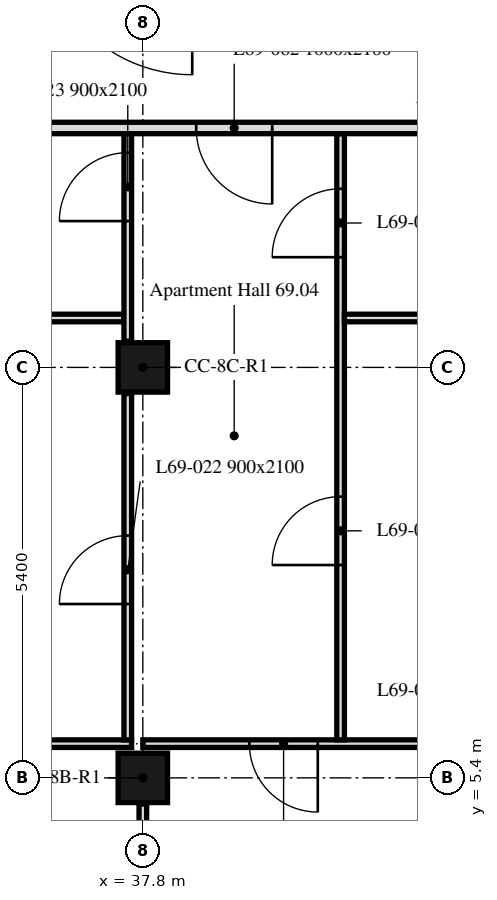
"""IFC4 building model, lengths in metres.
Left out: names, types, materials, properties, quantities, classifications, styles, units other than length and angle.
Written with IfcOpenShell. Run it as: python <this file> out.ifc"""

import sys

from ifc_helpers import new_model, si_unit, direction, frame, frame_2d, origin, origin_2d, place, context, subcontext, project, spatial, rectangle, extrude, element, fill, save


model = new_model("IFC4")
c1 = context("Model", 3, precision=1e-05, world=origin(), true_north=direction((0.0, 1.0)))
c2 = subcontext(c1, "Body", "Model", "MODEL_VIEW")
j1 = project(units=[si_unit("LENGTHUNIT", "METRE"), si_unit("PLANEANGLEUNIT", "RADIAN")], contexts=[c1])
p1 = place(None, origin())
s1 = spatial("IfcSite", under=j1, at=p1, CompositionType="ELEMENT")
p2 = place(p1, origin())
s2 = spatial("IfcBuilding", under=s1, at=p2, CompositionType="ELEMENT")
p3 = place(p2, frame((0.0, 0.0, 281.8)))
s3 = spatial("IfcBuildingStorey", under=s2, at=p3, CompositionType="ELEMENT", Elevation=281.8)
for number, where, z_axis, x_axis in (
    (1, (37.8, 5.4, 0.0), (0.0, 0.0, 1.0), (1.0, 0.0, 0.0)),
    (2, (37.8, 10.8, 0.0), (0.0, 0.0, 1.0), (1.0, 0.0, 0.0)),
):
    element("IfcColumn", number, at=place(p3, frame(where, z_axis=z_axis, x_axis=x_axis)), inside=s3, PredefinedType="COLUMN", context=c2, shape_type="SweptSolid", body=[
        extrude(rectangle(XDim=0.65, YDim=0.65, at=origin_2d()), origin(), (0.0, 0.0, 1.0), 3.0),
    ])
p4 = place(p3, frame((37.652, 5.85, 0.0), z_axis=(0.0, 0.0, 1.0), x_axis=(-1.0, 0.0, 0.0)))
e3 = element("IfcWall", 3, at=p4, inside=s3, PredefinedType="PARTITIONING", context=c2, shape_type="SweptSolid", body=[
    extrude(rectangle(XDim=31.501, YDim=0.1, at=frame_2d((15.75, 0.0))), origin(), (0.0, 0.0, 1.0), 2.4),
])
p5 = place(p4, frame((12.923, 0.0, 0.0)))
e4 = element("IfcOpeningElement", 4, at=p5, cuts=e3, PredefinedType="OPENING", context=c2, shape_type="SweptSolid", body=[
    extrude(rectangle(XDim=0.9, YDim=2.1, at=frame_2d((0.45, 1.05))), frame((0.0, 0.05, 0.0), z_axis=(0.0, -1.0, 0.0), x_axis=(1.0, 0.0, 0.0)), (0.0, 0.0, 1.0), 0.1),
])
p6 = place(p4, frame((29.422, 0.0, 0.0)))
e5 = element("IfcOpeningElement", 5, at=p6, cuts=e3, PredefinedType="OPENING", context=c2, shape_type="SweptSolid", body=[
    extrude(rectangle(XDim=0.9, YDim=2.1, at=frame_2d((0.45, 1.05))), frame((0.0, 0.05, 0.0), z_axis=(0.0, -1.0, 0.0), x_axis=(1.0, 0.0, 0.0)), (0.0, 0.0, 1.0), 0.1),
])
p7 = place(p4, frame((28.182, 0.0, 0.0)))
e6 = element("IfcOpeningElement", 6, at=p7, cuts=e3, PredefinedType="OPENING", context=c2, shape_type="SweptSolid", body=[
    extrude(rectangle(XDim=0.9, YDim=2.1, at=frame_2d((0.45, 1.05))), frame((0.0, 0.05, 0.0), z_axis=(0.0, -1.0, 0.0), x_axis=(1.0, 0.0, 0.0)), (0.0, 0.0, 1.0), 0.1),
])
p8 = place(p4, frame((23.942, 0.0, 0.0)))
e7 = element("IfcOpeningElement", 7, at=p8, cuts=e3, PredefinedType="OPENING", context=c2, shape_type="SweptSolid", body=[
    extrude(rectangle(XDim=0.9, YDim=2.1, at=frame_2d((0.45, 1.05))), frame((0.0, 0.05, 0.0), z_axis=(0.0, -1.0, 0.0), x_axis=(1.0, 0.0, 0.0)), (0.0, 0.0, 1.0), 0.1),
])
p9 = place(p4, frame((22.572, 0.0, 0.0)))
e8 = element("IfcOpeningElement", 8, at=p9, cuts=e3, PredefinedType="OPENING", context=c2, shape_type="SweptSolid", body=[
    extrude(rectangle(XDim=0.9, YDim=2.1, at=frame_2d((0.45, 1.05))), frame((0.0, 0.05, 0.0), z_axis=(0.0, -1.0, 0.0), x_axis=(1.0, 0.0, 0.0)), (0.0, 0.0, 1.0), 0.1),
])
p10 = place(p4, frame((19.466, 0.0, 0.0)))
e9 = element("IfcOpeningElement", 9, at=p10, cuts=e3, PredefinedType="OPENING", context=c2, shape_type="SweptSolid", body=[
    extrude(rectangle(XDim=0.9, YDim=2.1, at=frame_2d((0.45, 1.05))), frame((0.0, 0.05, 0.0), z_axis=(0.0, -1.0, 0.0), x_axis=(1.0, 0.0, 0.0)), (0.0, 0.0, 1.0), 0.1),
])
p11 = place(p4, frame((9.19, 0.0, 0.0)))
e10 = element("IfcOpeningElement", 10, at=p11, cuts=e3, PredefinedType="OPENING", context=c2, shape_type="SweptSolid", body=[
    extrude(rectangle(XDim=0.9, YDim=2.1, at=frame_2d((0.45, 1.05))), frame((0.0, 0.05, 0.0), z_axis=(0.0, -1.0, 0.0), x_axis=(1.0, 0.0, 0.0)), (0.0, 0.0, 1.0), 0.1),
])
p12 = place(p4, frame((7.512, 0.0, 0.0)))
e11 = element("IfcOpeningElement", 11, at=p12, cuts=e3, PredefinedType="OPENING", context=c2, shape_type="SweptSolid", body=[
    extrude(rectangle(XDim=0.9, YDim=2.1, at=frame_2d((0.45, 1.05))), frame((0.0, 0.05, 0.0), z_axis=(0.0, -1.0, 0.0), x_axis=(1.0, 0.0, 0.0)), (0.0, 0.0, 1.0), 0.1),
])
p13 = place(p4, frame((2.952, 0.0, 0.0)))
e12 = element("IfcOpeningElement", 12, at=p13, cuts=e3, PredefinedType="OPENING", context=c2, shape_type="SweptSolid", body=[
    extrude(rectangle(XDim=0.9, YDim=2.1, at=frame_2d((0.45, 1.05))), frame((0.0, 0.05, 0.0), z_axis=(0.0, -1.0, 0.0), x_axis=(1.0, 0.0, 0.0)), (0.0, 0.0, 1.0), 0.1),
])
p14 = place(p4, frame((18.096, 0.0, 0.0)))
e13 = element("IfcOpeningElement", 13, at=p14, cuts=e3, PredefinedType="OPENING", context=c2, shape_type="SweptSolid", body=[
    extrude(rectangle(XDim=0.9, YDim=2.1, at=frame_2d((0.45, 1.05))), frame((0.0, 0.05, 0.0), z_axis=(0.0, -1.0, 0.0), x_axis=(1.0, 0.0, 0.0)), (0.0, 0.0, 1.0), 0.1),
])
p15 = place(p3, frame((37.8, 0.751, 0.0), z_axis=(0.0, 0.0, 1.0), x_axis=(0.0, 1.0, 0.0)))
e14 = element("IfcWall", 14, at=p15, inside=s3, PredefinedType="PARTITIONING", context=c2, shape_type="SweptSolid", body=[
    extrude(rectangle(XDim=4.304, YDim=0.1, at=frame_2d((2.152, 0.0))), origin(), (0.0, 0.0, 1.0), 2.4),
])
p16 = place(p15, frame((1.18, 0.0, 0.0)))
e15 = element("IfcOpeningElement", 15, at=p16, cuts=e14, PredefinedType="OPENING", context=c2, shape_type="SweptSolid", body=[
    extrude(rectangle(XDim=0.9, YDim=2.1, at=frame_2d((0.45, 1.05))), frame((0.0, 0.05, 0.0), z_axis=(0.0, -1.0, 0.0), x_axis=(1.0, 0.0, 0.0)), (0.0, 0.0, 1.0), 0.1),
])
p17 = place(p3, frame((43.15, 5.85, 0.0), z_axis=(0.0, 0.0, 1.0), x_axis=(-1.0, 0.0, 0.0)))
e16 = element("IfcWall", 16, at=p17, inside=s3, PredefinedType="PARTITIONING", context=c2, shape_type="SweptSolid", body=[
    extrude(rectangle(XDim=5.35, YDim=0.1, at=frame_2d((2.675, 0.0))), origin(), (0.0, 0.0, 1.0), 3.0),
])
p18 = place(p17, frame((3.048, 0.0, 0.0)))
e17 = element("IfcOpeningElement", 17, at=p18, cuts=e16, PredefinedType="OPENING", context=c2, shape_type="SweptSolid", body=[
    extrude(rectangle(XDim=0.9, YDim=2.1, at=frame_2d((0.45, 1.05))), frame((0.0, 0.05, 0.0), z_axis=(0.0, -1.0, 0.0), x_axis=(1.0, 0.0, 0.0)), (0.0, 0.0, 1.0), 0.1),
])
p19 = place(p3, frame((37.602, 5.9, 0.0), z_axis=(0.0, 0.0, 1.0), x_axis=(0.0, 1.0, 0.0)))
e18 = element("IfcWall", 18, at=p19, inside=s3, PredefinedType="PARTITIONING", context=c2, shape_type="SweptSolid", body=[
    extrude(rectangle(XDim=4.555, YDim=0.1, at=frame_2d((2.278, 0.0))), origin(), (0.0, 0.0, 1.0), 2.4),
])
p20 = place(p19, frame((1.787, 0.0, 0.0)))
e19 = element("IfcOpeningElement", 19, at=p20, cuts=e18, PredefinedType="OPENING", context=c2, shape_type="SweptSolid", body=[
    extrude(rectangle(XDim=0.9, YDim=2.1, at=frame_2d((0.45, 1.05))), frame((0.0, 0.05, 0.0), z_axis=(0.0, -1.0, 0.0), x_axis=(1.0, 0.0, 0.0)), (0.0, 0.0, 1.0), 0.1),
])
p21 = place(p3, frame((37.552, 11.45, 0.0), z_axis=(0.0, 0.0, 1.0), x_axis=(-1.0, 0.0, 0.0)))
e20 = element("IfcWall", 20, at=p21, inside=s3, PredefinedType="PARTITIONING", context=c2, shape_type="SweptSolid", body=[
    extrude(rectangle(XDim=2.502, YDim=0.1, at=frame_2d((1.251, 0.0))), origin(), (0.0, 0.0, 1.0), 3.0),
])
p22 = place(p3, frame((37.602, 11.145, 0.0), z_axis=(0.0, 0.0, 1.0), x_axis=(0.0, 1.0, 0.0)))
e21 = element("IfcWall", 21, at=p22, inside=s3, PredefinedType="PARTITIONING", context=c2, shape_type="SweptSolid", body=[
    extrude(rectangle(XDim=2.73, YDim=0.1, at=frame_2d((1.365, 0.0))), origin(), (0.0, 0.0, 1.0), 2.4),
])
p23 = place(p22, frame((1.58, 0.0, 0.0)))
e22 = element("IfcOpeningElement", 22, at=p23, cuts=e21, PredefinedType="OPENING", context=c2, shape_type="SweptSolid", body=[
    extrude(rectangle(XDim=0.9, YDim=2.1, at=frame_2d((0.45, 1.05))), frame((0.0, 0.05, 0.0), z_axis=(0.0, -1.0, 0.0), x_axis=(1.0, 0.0, 0.0)), (0.0, 0.0, 1.0), 0.1),
])
p24 = place(p3, frame((40.402, 5.9, 0.0), z_axis=(0.0, 0.0, 1.0), x_axis=(0.0, 1.0, 0.0)))
e23 = element("IfcWall", 23, at=p24, inside=s3, PredefinedType="PARTITIONING", context=c2, shape_type="SweptSolid", body=[
    extrude(rectangle(XDim=7.975, YDim=0.1, at=frame_2d((3.988, 0.0))), origin(), (0.0, 0.0, 1.0), 2.4),
])
p25 = place(p24, frame((2.3, 0.0, 0.0)))
e24 = element("IfcOpeningElement", 24, at=p25, cuts=e23, PredefinedType="OPENING", context=c2, shape_type="SweptSolid", body=[
    extrude(rectangle(XDim=0.9, YDim=2.1, at=frame_2d((0.45, 1.05))), frame((0.0, 0.05, 0.0), z_axis=(0.0, -1.0, 0.0), x_axis=(1.0, 0.0, 0.0)), (0.0, 0.0, 1.0), 0.1),
])
p26 = place(p24, frame((6.35, 0.0, 0.0)))
e25 = element("IfcOpeningElement", 25, at=p26, cuts=e23, PredefinedType="OPENING", context=c2, shape_type="SweptSolid", body=[
    extrude(rectangle(XDim=0.9, YDim=2.1, at=frame_2d((0.45, 1.05))), frame((0.0, 0.05, 0.0), z_axis=(0.0, -1.0, 0.0), x_axis=(1.0, 0.0, 0.0)), (0.0, 0.0, 1.0), 0.1),
])
p27 = place(p3, frame((43.231, 11.45, 0.0), z_axis=(0.0, 0.0, 1.0), x_axis=(-1.0, 0.0, 0.0)))
e26 = element("IfcWall", 26, at=p27, inside=s3, PredefinedType="PARTITIONING", context=c2, shape_type="SweptSolid", body=[
    extrude(rectangle(XDim=2.779, YDim=0.1, at=frame_2d((1.39, 0.0))), origin(), (0.0, 0.0, 1.0), 3.0),
])
p28 = place(p3, frame((47.849, 13.95, 0.0), z_axis=(0.0, 0.0, 1.0), x_axis=(-1.0, 0.0, 0.0)))
e27 = element("IfcWall", 27, at=p28, inside=s3, PredefinedType="PARTITIONING", context=c2, shape_type="SweptSolid", body=[
    extrude(rectangle(XDim=41.698, YDim=0.15, at=frame_2d((20.849, 0.0))), origin(), (0.0, 0.0, 1.0), 2.4),
])
p29 = place(p28, frame((37.749, 0.0, 0.0)))
e28 = element("IfcOpeningElement", 28, at=p29, cuts=e27, PredefinedType="OPENING", context=c2, shape_type="SweptSolid", body=[
    extrude(rectangle(XDim=1.0, YDim=2.1, at=frame_2d((0.5, 1.05))), frame((0.0, 0.075, 0.0), z_axis=(0.0, -1.0, 0.0), x_axis=(1.0, 0.0, 0.0)), (0.0, 0.0, 1.0), 0.15),
])
p30 = place(p28, frame((32.244, 0.0, 0.0)))
e29 = element("IfcOpeningElement", 29, at=p30, cuts=e27, PredefinedType="OPENING", context=c2, shape_type="SweptSolid", body=[
    extrude(rectangle(XDim=1.0, YDim=2.1, at=frame_2d((0.5, 1.05))), frame((0.0, 0.075, 0.0), z_axis=(0.0, -1.0, 0.0), x_axis=(1.0, 0.0, 0.0)), (0.0, 0.0, 1.0), 0.15),
])
p31 = place(p28, frame((27.735, 0.0, 0.0)))
e30 = element("IfcOpeningElement", 30, at=p31, cuts=e27, PredefinedType="OPENING", context=c2, shape_type="SweptSolid", body=[
    extrude(rectangle(XDim=1.0, YDim=2.1, at=frame_2d((0.5, 1.05))), frame((0.0, 0.075, 0.0), z_axis=(0.0, -1.0, 0.0), x_axis=(1.0, 0.0, 0.0)), (0.0, 0.0, 1.0), 0.15),
])
p32 = place(p28, frame((8.347, 0.0, 0.0)))
e31 = element("IfcOpeningElement", 31, at=p32, cuts=e27, PredefinedType="OPENING", context=c2, shape_type="SweptSolid", body=[
    extrude(rectangle(XDim=1.0, YDim=2.1, at=frame_2d((0.5, 1.05))), frame((0.0, 0.075, 0.0), z_axis=(0.0, -1.0, 0.0), x_axis=(1.0, 0.0, 0.0)), (0.0, 0.0, 1.0), 0.15),
])
p33 = place(p20, origin())
e32 = element("IfcDoor", 32, at=p33, inside=s3, OperationType="SINGLE_SWING_RIGHT", PredefinedType="DOOR", context=c2, shape_type="SweptSolid", body=[
    extrude(rectangle(XDim=0.9, YDim=2.1, at=frame_2d((0.45, 1.05))), frame((0.0, 0.025, 0.0), z_axis=(0.0, -1.0, 0.0), x_axis=(1.0, 0.0, 0.0)), (0.0, 0.0, 1.0), 0.05),
])
fill(e19, e32)
p34 = place(p23, origin())
e33 = element("IfcDoor", 33, at=p34, inside=s3, OperationType="SINGLE_SWING_LEFT", PredefinedType="DOOR", context=c2, shape_type="SweptSolid", body=[
    extrude(rectangle(XDim=0.9, YDim=2.1, at=frame_2d((0.45, 1.05))), frame((0.0, 0.025, 0.0), z_axis=(0.0, -1.0, 0.0), x_axis=(1.0, 0.0, 0.0)), (0.0, 0.0, 1.0), 0.05),
])
fill(e22, e33)
p35 = place(p25, origin())
e34 = element("IfcDoor", 34, at=p35, inside=s3, OperationType="SINGLE_SWING_LEFT", PredefinedType="DOOR", context=c2, shape_type="SweptSolid", body=[
    extrude(rectangle(XDim=0.9, YDim=2.1, at=frame_2d((0.45, 1.05))), frame((0.0, 0.025, 0.0), z_axis=(0.0, -1.0, 0.0), x_axis=(1.0, 0.0, 0.0)), (0.0, 0.0, 1.0), 0.05),
])
fill(e24, e34)
p36 = place(p26, origin())
e35 = element("IfcDoor", 35, at=p36, inside=s3, OperationType="SINGLE_SWING_LEFT", PredefinedType="DOOR", context=c2, shape_type="SweptSolid", body=[
    extrude(rectangle(XDim=0.9, YDim=2.1, at=frame_2d((0.45, 1.05))), frame((0.0, 0.025, 0.0), z_axis=(0.0, -1.0, 0.0), x_axis=(1.0, 0.0, 0.0)), (0.0, 0.0, 1.0), 0.05),
])
fill(e25, e35)
p37 = place(p18, origin())
e36 = element("IfcDoor", 36, at=p37, inside=s3, OperationType="SINGLE_SWING_RIGHT", PredefinedType="DOOR", context=c2, shape_type="SweptSolid", body=[
    extrude(rectangle(XDim=0.9, YDim=2.1, at=frame_2d((0.45, 1.05))), frame((0.0, 0.025, 0.0), z_axis=(0.0, -1.0, 0.0), x_axis=(1.0, 0.0, 0.0)), (0.0, 0.0, 1.0), 0.05),
])
fill(e17, e36)
p38 = place(p32, origin())
e37 = element("IfcDoor", 37, at=p38, inside=s3, OperationType="SINGLE_SWING_LEFT", PredefinedType="DOOR", context=c2, shape_type="SweptSolid", body=[
    extrude(rectangle(XDim=1.0, YDim=2.1, at=frame_2d((0.5, 1.05))), frame((0.0, 0.025, 0.0), z_axis=(0.0, -1.0, 0.0), x_axis=(1.0, 0.0, 0.0)), (0.0, 0.0, 1.0), 0.05),
])
fill(e31, e37)
save(model, sys.argv[1])
